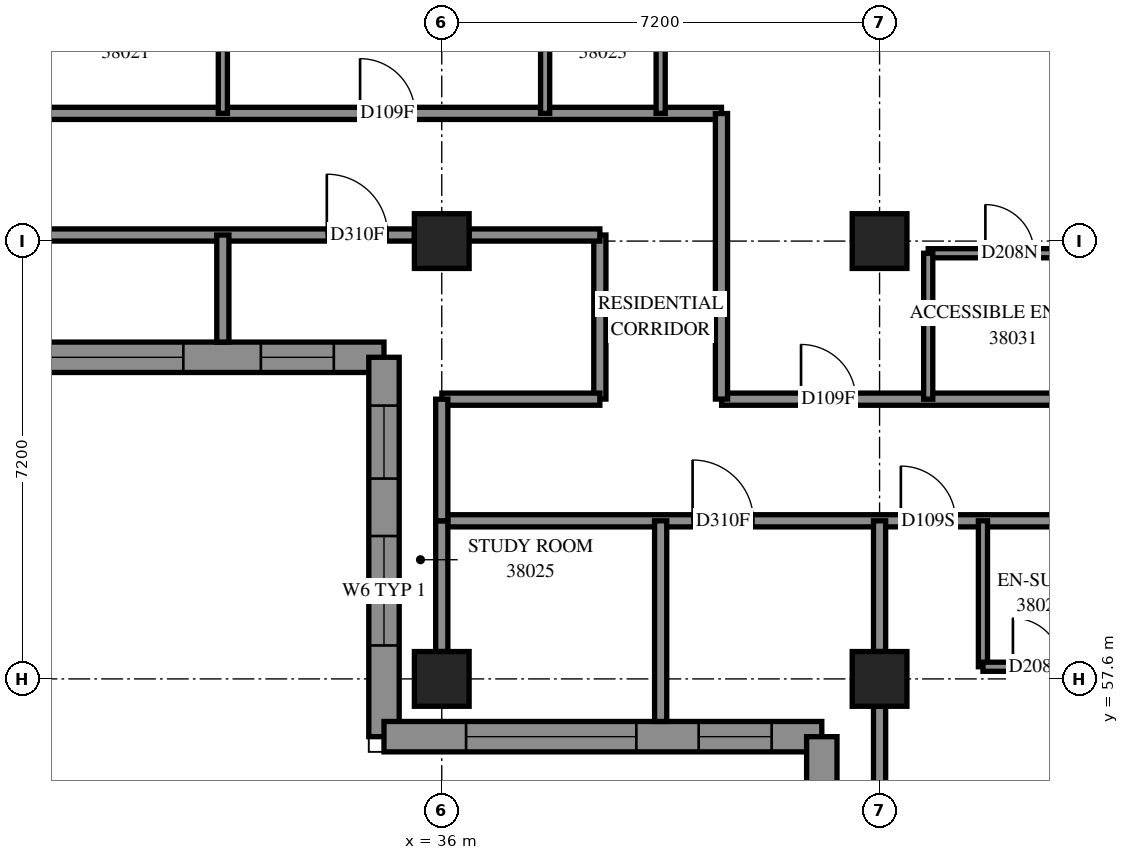
"""IFC4 building model, lengths in metres.
Left out: names, types, materials, properties, quantities, classifications, styles, units other than length and angle.
Written with IfcOpenShell. Run it as: python <this file> out.ifc"""

import sys

from ifc_helpers import new_model, si_unit, direction, frame, frame_2d, origin, origin_2d, place, context, subcontext, project, spatial, polyline, rectangle, outline, extrude, element, fill, save


model = new_model("IFC4")
c1 = context("Model", 3, precision=1e-05, world=origin(), true_north=direction((0.0, 1.0)))
c2 = subcontext(c1, "Body", "Model", "MODEL_VIEW")
j1 = project(units=[si_unit("LENGTHUNIT", "METRE"), si_unit("PLANEANGLEUNIT", "RADIAN")], contexts=[c1])
p1 = place(None, origin())
s1 = spatial("IfcSite", under=j1, at=p1, CompositionType="ELEMENT")
p2 = place(p1, origin())
s2 = spatial("IfcBuilding", under=s1, at=p2, CompositionType="ELEMENT")
p3 = place(p2, frame((0.0, 0.0, 142.2)))
s3 = spatial("IfcBuildingStorey", under=s2, at=p3, CompositionType="ELEMENT", Elevation=142.2)
for number, where, z_axis, x_axis in (
    (1, (36.0, 57.6, 0.0), (0.0, 0.0, 1.0), (1.0, 0.0, 0.0)),
    (2, (36.0, 64.8, 0.0), (0.0, 0.0, 1.0), (1.0, 0.0, 0.0)),
    (3, (43.2, 57.6, 0.0), (0.0, 0.0, 1.0), (1.0, 0.0, 0.0)),
    (4, (43.2, 64.8, 0.0), (0.0, 0.0, 1.0), (1.0, 0.0, 0.0)),
):
    element("IfcColumn", number, at=place(p3, frame(where, z_axis=z_axis, x_axis=x_axis)), inside=s3, PredefinedType="COLUMN", context=c2, shape_type="SweptSolid", body=[
        extrude(rectangle(XDim=0.9, YDim=0.9, at=origin_2d()), origin(), (0.0, 0.0, 1.0), 3.1),
    ])
p4 = place(p3, frame((19.689, 62.889, 0.0), z_axis=(0.0, 0.0, 1.0), x_axis=(1.0, 0.0, 0.0)))
e5 = element("IfcWall", 5, at=p4, inside=s3, PredefinedType="SOLIDWALL", context=c2, shape_type="SweptSolid", body=[
    extrude(outline(polyline([(-0.25, -0.25), (15.111, -0.25), (15.611, 0.25), (0.25, 0.25), (-0.25, -0.25)])), origin(), (0.0, 0.0, 1.0), 3.1),
])
p5 = place(p4, frame((2.311, 0.0, 0.45)))
e6 = element("IfcOpeningElement", 6, at=p5, cuts=e5, PredefinedType="OPENING", context=c2, shape_type="SweptSolid", body=[
    extrude(rectangle(XDim=2.8, YDim=2.5, at=frame_2d((1.4, 1.25))), frame((0.0, 0.26, 0.0), z_axis=(0.0, -1.0, 0.0), x_axis=(1.0, 0.0, 0.0)), (0.0, 0.0, 1.0), 0.52),
])
p6 = place(p4, frame((5.911, 0.0, 0.45)))
e7 = element("IfcOpeningElement", 7, at=p6, cuts=e5, PredefinedType="OPENING", context=c2, shape_type="SweptSolid", body=[
    extrude(rectangle(XDim=2.8, YDim=2.5, at=frame_2d((1.4, 1.25))), frame((0.0, 0.26, 0.0), z_axis=(0.0, -1.0, 0.0), x_axis=(1.0, 0.0, 0.0)), (0.0, 0.0, 1.0), 0.52),
])
p7 = place(p4, frame((9.261, 0.0, 0.45)))
e8 = element("IfcOpeningElement", 8, at=p7, cuts=e5, PredefinedType="OPENING", context=c2, shape_type="SweptSolid", body=[
    extrude(rectangle(XDim=2.8, YDim=2.5, at=frame_2d((1.4, 1.25))), frame((0.0, 0.26, 0.0), z_axis=(0.0, -1.0, 0.0), x_axis=(1.0, 0.0, 0.0)), (0.0, 0.0, 1.0), 0.52),
])
p8 = place(p4, frame((0.581, 0.0, 0.45)))
e9 = element("IfcOpeningElement", 9, at=p8, cuts=e5, PredefinedType="OPENING", context=c2, shape_type="SweptSolid", body=[
    extrude(rectangle(XDim=1.2, YDim=2.5, at=frame_2d((0.6, 1.25))), frame((0.0, 0.26, 0.0), z_axis=(0.0, -1.0, 0.0), x_axis=(1.0, 0.0, 0.0)), (0.0, 0.0, 1.0), 0.52),
])
p9 = place(p4, frame((13.336, 0.0, 0.45)))
e10 = element("IfcOpeningElement", 10, at=p9, cuts=e5, PredefinedType="OPENING", context=c2, shape_type="SweptSolid", body=[
    extrude(rectangle(XDim=1.2, YDim=2.5, at=frame_2d((0.6, 1.25))), frame((0.0, 0.26, 0.0), z_axis=(0.0, -1.0, 0.0), x_axis=(1.0, 0.0, 0.0)), (0.0, 0.0, 1.0), 0.52),
])
p10 = place(p3, frame((35.05, 62.889, 0.0), z_axis=(0.0, 0.0, 1.0), x_axis=(0.0, -1.0, 0.0)))
e11 = element("IfcWall", 11, at=p10, inside=s3, PredefinedType="SOLIDWALL", context=c2, shape_type="SweptSolid", body=[
    extrude(outline(polyline([(0.25, -0.25), (6.489, -0.25), (5.989, 0.25), (-0.25, 0.25), (0.25, -0.25)])), origin(), (0.0, 0.0, 1.0), 3.1),
])
p11 = place(p10, frame((0.794, 0.0, 0.45)))
e12 = element("IfcOpeningElement", 12, at=p11, cuts=e11, PredefinedType="OPENING", context=c2, shape_type="SweptSolid", body=[
    extrude(rectangle(XDim=1.2, YDim=2.5, at=frame_2d((0.6, 1.25))), frame((0.0, 0.26, 0.0), z_axis=(0.0, -1.0, 0.0), x_axis=(1.0, 0.0, 0.0)), (0.0, 0.0, 1.0), 0.52),
])
p12 = place(p10, frame((2.939, 0.0, 0.7)))
e13 = element("IfcOpeningElement", 13, at=p12, cuts=e11, PredefinedType="OPENING", context=c2, shape_type="SweptSolid", body=[
    extrude(rectangle(XDim=1.8, YDim=2.2, at=frame_2d((0.9, 1.1))), frame((0.0, 0.26, 0.0), z_axis=(0.0, -1.0, 0.0), x_axis=(1.0, 0.0, 0.0)), (0.0, 0.0, 1.0), 0.52),
])
p13 = place(p3, frame((35.05, 56.65, 0.0), z_axis=(0.0, 0.0, 1.0), x_axis=(1.0, 0.0, 0.0)))
e14 = element("IfcWall", 14, at=p13, inside=s3, PredefinedType="SOLIDWALL", context=c2, shape_type="SweptSolid", body=[
    extrude(outline(polyline([(-0.25, -0.25), (6.95, -0.25), (7.45, 0.25), (0.25, 0.25), (-0.25, -0.25)])), origin(), (0.0, 0.0, 1.0), 3.1),
])
p14 = place(p13, frame((1.35, 0.0, 0.45)))
e15 = element("IfcOpeningElement", 15, at=p14, cuts=e14, PredefinedType="OPENING", context=c2, shape_type="SweptSolid", body=[
    extrude(rectangle(XDim=2.8, YDim=2.5, at=frame_2d((1.4, 1.25))), frame((0.0, 0.26, 0.0), z_axis=(0.0, -1.0, 0.0), x_axis=(1.0, 0.0, 0.0)), (0.0, 0.0, 1.0), 0.52),
])
p15 = place(p13, frame((5.175, 0.0, 0.45)))
e16 = element("IfcOpeningElement", 16, at=p15, cuts=e14, PredefinedType="OPENING", context=c2, shape_type="SweptSolid", body=[
    extrude(rectangle(XDim=1.2, YDim=2.5, at=frame_2d((0.6, 1.25))), frame((0.0, 0.26, 0.0), z_axis=(0.0, -1.0, 0.0), x_axis=(1.0, 0.0, 0.0)), (0.0, 0.0, 1.0), 0.52),
])
p16 = place(p3, frame((42.25, 56.65, 0.0), z_axis=(0.0, 0.0, 1.0), x_axis=(0.0, -1.0, 0.0)))
e17 = element("IfcWall", 17, at=p16, inside=s3, PredefinedType="SOLIDWALL", context=c2, shape_type="SweptSolid", body=[
    extrude(outline(polyline([(0.25, -0.25), (7.45, -0.25), (6.95, 0.25), (-0.25, 0.25), (0.25, -0.25)])), origin(), (0.0, 0.0, 1.0), 3.1),
])
p17 = place(p16, frame((3.05, 0.0, 0.45)))
e18 = element("IfcOpeningElement", 18, at=p17, cuts=e17, PredefinedType="OPENING", context=c2, shape_type="SweptSolid", body=[
    extrude(rectangle(XDim=2.8, YDim=2.5, at=frame_2d((1.4, 1.25))), frame((0.0, 0.26, 0.0), z_axis=(0.0, -1.0, 0.0), x_axis=(1.0, 0.0, 0.0)), (0.0, 0.0, 1.0), 0.52),
])
p18 = place(p16, frame((0.825, 0.0, 0.45)))
e19 = element("IfcOpeningElement", 19, at=p18, cuts=e17, PredefinedType="OPENING", context=c2, shape_type="SweptSolid", body=[
    extrude(rectangle(XDim=1.2, YDim=2.5, at=frame_2d((0.6, 1.25))), frame((0.0, 0.26, 0.0), z_axis=(0.0, -1.0, 0.0), x_axis=(1.0, 0.0, 0.0)), (0.0, 0.0, 1.0), 0.52),
])
p19 = place(p3, frame((21.6, 66.9, 0.0), z_axis=(0.0, 0.0, 1.0), x_axis=(1.0, 0.0, 0.0)))
e20 = element("IfcWall", 20, at=p19, inside=s3, PredefinedType="PARTITIONING", context=c2, shape_type="SweptSolid", body=[
    extrude(rectangle(XDim=19.0, YDim=0.2, at=frame_2d((9.5, 0.0))), origin(), (0.0, 0.0, 1.0), 3.1),
])
p20 = place(p19, frame((2.3, 0.0, 0.0)))
e21 = element("IfcOpeningElement", 21, at=p20, cuts=e20, PredefinedType="OPENING", context=c2, shape_type="SweptSolid", body=[
    extrude(rectangle(XDim=0.9, YDim=2.1, at=frame_2d((0.45, 1.05))), frame((0.0, 0.11, 0.0), z_axis=(0.0, -1.0, 0.0), x_axis=(1.0, 0.0, 0.0)), (0.0, 0.0, 1.0), 0.22),
])
p21 = place(p19, frame((5.957, 0.0, 0.0)))
e22 = element("IfcOpeningElement", 22, at=p21, cuts=e20, PredefinedType="OPENING", context=c2, shape_type="SweptSolid", body=[
    extrude(rectangle(XDim=0.9, YDim=2.1, at=frame_2d((0.45, 1.05))), frame((0.0, 0.11, 0.0), z_axis=(0.0, -1.0, 0.0), x_axis=(1.0, 0.0, 0.0)), (0.0, 0.0, 1.0), 0.22),
])
p22 = place(p19, frame((13.057, 0.0, 0.0)))
e23 = element("IfcOpeningElement", 23, at=p22, cuts=e20, PredefinedType="OPENING", context=c2, shape_type="SweptSolid", body=[
    extrude(rectangle(XDim=0.9, YDim=2.1, at=frame_2d((0.45, 1.05))), frame((0.0, 0.11, 0.0), z_axis=(0.0, -1.0, 0.0), x_axis=(1.0, 0.0, 0.0)), (0.0, 0.0, 1.0), 0.22),
])
p23 = place(p3, frame((36.0, 60.2, 0.0), z_axis=(0.0, 0.0, 1.0), x_axis=(1.0, 0.0, 0.0)))
e24 = element("IfcWall", 24, at=p23, inside=s3, PredefinedType="PARTITIONING", context=c2, shape_type="SweptSolid", body=[
    extrude(rectangle(XDim=17.0, YDim=0.2, at=frame_2d((8.5, 0.0))), origin(), (0.0, 0.0, 1.0), 3.1),
])
p24 = place(p23, frame((15.805, 0.0, 0.0)))
e25 = element("IfcOpeningElement", 25, at=p24, cuts=e24, PredefinedType="OPENING", context=c2, shape_type="SweptSolid", body=[
    extrude(rectangle(XDim=1.0, YDim=2.1, at=frame_2d((0.5, 1.05))), frame((0.0, 0.11, 0.0), z_axis=(0.0, -1.0, 0.0), x_axis=(1.0, 0.0, 0.0)), (0.0, 0.0, 1.0), 0.22),
])
p25 = place(p23, frame((4.125, 0.0, 0.0)))
e26 = element("IfcOpeningElement", 26, at=p25, cuts=e24, PredefinedType="OPENING", context=c2, shape_type="SweptSolid", body=[
    extrude(rectangle(XDim=1.0, YDim=2.1, at=frame_2d((0.5, 1.05))), frame((0.0, 0.11, 0.0), z_axis=(0.0, -1.0, 0.0), x_axis=(1.0, 0.0, 0.0)), (0.0, 0.0, 1.0), 0.22),
])
p26 = place(p23, frame((7.55, 0.0, 0.0)))
e27 = element("IfcOpeningElement", 27, at=p26, cuts=e24, PredefinedType="OPENING", context=c2, shape_type="SweptSolid", body=[
    extrude(rectangle(XDim=0.9, YDim=2.1, at=frame_2d((0.45, 1.05))), frame((0.0, 0.11, 0.0), z_axis=(0.0, -1.0, 0.0), x_axis=(1.0, 0.0, 0.0)), (0.0, 0.0, 1.0), 0.22),
])
p27 = place(p23, frame((11.635, 0.0, 0.0)))
e28 = element("IfcOpeningElement", 28, at=p27, cuts=e24, PredefinedType="OPENING", context=c2, shape_type="SweptSolid", body=[
    extrude(rectangle(XDim=1.0, YDim=2.1, at=frame_2d((0.5, 1.05))), frame((0.0, 0.11, 0.0), z_axis=(0.0, -1.0, 0.0), x_axis=(1.0, 0.0, 0.0)), (0.0, 0.0, 1.0), 0.22),
])
p28 = place(p3, frame((40.602, 62.2, 0.0), z_axis=(0.0, 0.0, 1.0), x_axis=(1.0, 0.0, 0.0)))
e29 = element("IfcWall", 29, at=p28, inside=s3, PredefinedType="PARTITIONING", context=c2, shape_type="SweptSolid", body=[
    extrude(rectangle(XDim=14.298, YDim=0.2, at=frame_2d((7.149, 0.0))), origin(), (0.0, 0.0, 1.0), 3.1),
])
p29 = place(p28, frame((1.306, 0.0, 0.0)))
e30 = element("IfcOpeningElement", 30, at=p29, cuts=e29, PredefinedType="OPENING", context=c2, shape_type="SweptSolid", body=[
    extrude(rectangle(XDim=0.9, YDim=2.1, at=frame_2d((0.45, 1.05))), frame((0.0, 0.11, 0.0), z_axis=(0.0, -1.0, 0.0), x_axis=(1.0, 0.0, 0.0)), (0.0, 0.0, 1.0), 0.22),
])
p30 = place(p28, frame((8.455, 0.0, 0.0)))
e31 = element("IfcOpeningElement", 31, at=p30, cuts=e29, PredefinedType="OPENING", context=c2, shape_type="SweptSolid", body=[
    extrude(rectangle(XDim=0.9, YDim=2.1, at=frame_2d((0.45, 1.05))), frame((0.0, 0.11, 0.0), z_axis=(0.0, -1.0, 0.0), x_axis=(1.0, 0.0, 0.0)), (0.0, 0.0, 1.0), 0.22),
])
p31 = place(p3, frame((29.25, 64.9, 0.0), z_axis=(0.0, 0.0, 1.0), x_axis=(1.0, 0.0, 0.0)))
e32 = element("IfcWall", 32, at=p31, inside=s3, PredefinedType="PARTITIONING", context=c2, shape_type="SweptSolid", body=[
    extrude(rectangle(XDim=6.3, YDim=0.2, at=frame_2d((3.15, 0.0))), origin(), (0.0, 0.0, 1.0), 2.6),
])
p32 = place(p31, frame((4.86, 0.0, 0.0)))
e33 = element("IfcOpeningElement", 33, at=p32, cuts=e32, PredefinedType="OPENING", context=c2, shape_type="SweptSolid", body=[
    extrude(rectangle(XDim=1.0, YDim=2.1, at=frame_2d((0.5, 1.05))), frame((0.0, 0.11, 0.0), z_axis=(0.0, -1.0, 0.0), x_axis=(1.0, 0.0, 0.0)), (0.0, 0.0, 1.0), 0.22),
])
p33 = place(p3, frame((43.2, 50.85, 0.0), z_axis=(0.0, 0.0, 1.0), x_axis=(0.0, 1.0, 0.0)))
e34 = element("IfcWall", 34, at=p33, inside=s3, PredefinedType="PARTITIONING", context=c2, shape_type="SweptSolid", body=[
    extrude(rectangle(XDim=6.3, YDim=0.2, at=frame_2d((3.15, 0.0))), origin(), (0.0, 0.0, 1.0), 2.6),
])
p34 = place(p3, frame((40.6, 62.202, 0.0), z_axis=(0.0, 0.0, 1.0), x_axis=(0.0, 1.0, 0.0)))
e35 = element("IfcWall", 35, at=p34, inside=s3, PredefinedType="PARTITIONING", context=c2, shape_type="SweptSolid", body=[
    extrude(rectangle(XDim=4.696, YDim=0.2, at=frame_2d((2.348, 0.0))), origin(), (0.0, 0.0, 1.0), 3.1),
])
p35 = place(p3, frame((39.6, 56.9, 0.0), z_axis=(0.0, 0.0, 1.0), x_axis=(0.0, 1.0, 0.0)))
e36 = element("IfcWall", 36, at=p35, inside=s3, PredefinedType="PARTITIONING", context=c2, shape_type="SweptSolid", body=[
    extrude(rectangle(XDim=3.3, YDim=0.2, at=frame_2d((1.65, 0.0))), origin(), (0.0, 0.0, 1.0), 3.1),
])
p36 = place(p3, frame((44.0, 64.6, 0.0), z_axis=(0.0, 0.0, 1.0), x_axis=(1.0, 0.0, 0.0)))
e37 = element("IfcWall", 37, at=p36, inside=s3, PredefinedType="PARTITIONING", context=c2, shape_type="SweptSolid", body=[
    extrude(rectangle(XDim=2.8, YDim=0.15, at=frame_2d((1.4, 0.0))), origin(), (0.0, 0.0, 1.0), 3.1),
])
p37 = place(p36, frame((0.94, 0.0, 0.0)))
e38 = element("IfcOpeningElement", 38, at=p37, cuts=e37, PredefinedType="OPENING", context=c2, shape_type="SweptSolid", body=[
    extrude(rectangle(XDim=0.8, YDim=2.1, at=frame_2d((0.4, 1.05))), frame((0.0, 0.085, 0.0), z_axis=(0.0, -1.0, 0.0), x_axis=(1.0, 0.0, 0.0)), (0.0, 0.0, 1.0), 0.17),
])
p38 = place(p3, frame((38.6, 62.202, 0.0), z_axis=(0.0, 0.0, 1.0), x_axis=(0.0, 1.0, 0.0)))
e39 = element("IfcWall", 39, at=p38, inside=s3, PredefinedType="PARTITIONING", context=c2, shape_type="SweptSolid", body=[
    extrude(rectangle(XDim=2.698, YDim=0.2, at=frame_2d((1.349, 0.0))), origin(), (0.0, 0.0, 1.0), 3.1),
])
p39 = place(p3, frame((36.002, 62.2, 0.0), z_axis=(0.0, 0.0, 1.0), x_axis=(1.0, 0.0, 0.0)))
e40 = element("IfcWall", 40, at=p39, inside=s3, PredefinedType="PARTITIONING", context=c2, shape_type="SweptSolid", body=[
    extrude(rectangle(XDim=2.598, YDim=0.2, at=frame_2d((1.299, 0.0))), origin(), (0.0, 0.0, 1.0), 3.1),
])
for number, where, z_axis, x_axis in (
    (41, (44.9, 57.8, 0.0), (0.0, 0.0, 1.0), (0.0, 1.0, 0.0)),
    (42, (32.4, 66.9, 0.0), (0.0, 0.0, 1.0), (0.0, 1.0, 0.0)),
    (43, (37.7, 66.9, 0.0), (0.0, 0.0, 1.0), (0.0, 1.0, 0.0)),
    (44, (39.6, 66.9, 0.0), (0.0, 0.0, 1.0), (0.0, 1.0, 0.0)),
    (45, (44.0, 62.2, 0.0), (0.0, 0.0, 1.0), (0.0, 1.0, 0.0)),
):
    element("IfcWall", number, at=place(p3, frame(where, z_axis=z_axis, x_axis=x_axis)), inside=s3, PredefinedType="PARTITIONING", context=c2, shape_type="SweptSolid", body=[
        extrude(rectangle(XDim=2.4, YDim=0.15, at=frame_2d((1.2, 0.0))), origin(), (0.0, 0.0, 1.0), 3.1),
    ])
p40 = place(p3, frame((36.0, 58.05, 0.0), z_axis=(0.0, 0.0, 1.0), x_axis=(0.0, 1.0, 0.0)))
e46 = element("IfcWall", 46, at=p40, inside=s3, PredefinedType="PARTITIONING", context=c2, shape_type="SweptSolid", body=[
    extrude(rectangle(XDim=2.15, YDim=0.2, at=frame_2d((1.075, 0.0))), origin(), (0.0, 0.0, 1.0), 2.6),
])
for number, where, z_axis, x_axis in (
    (47, (43.2, 58.05, 0.0), (0.0, 0.0, 1.0), (0.0, 1.0, 0.0)),
    (48, (36.45, 64.9, 0.0), (0.0, 0.0, 1.0), (1.0, 0.0, 0.0)),
):
    element("IfcWall", number, at=place(p3, frame(where, z_axis=z_axis, x_axis=x_axis)), inside=s3, PredefinedType="PARTITIONING", context=c2, shape_type="SweptSolid", body=[
        extrude(rectangle(XDim=2.15, YDim=0.2, at=frame_2d((1.075, 0.0))), origin(), (0.0, 0.0, 1.0), 3.1),
    ])
p41 = place(p3, frame((36.0, 60.2, 0.0), z_axis=(0.0, 0.0, 1.0), x_axis=(0.0, 1.0, 0.0)))
e49 = element("IfcWall", 49, at=p41, inside=s3, PredefinedType="PARTITIONING", context=c2, shape_type="SweptSolid", body=[
    extrude(rectangle(XDim=2.0, YDim=0.2, at=frame_2d((1.0, 0.0))), origin(), (0.0, 0.0, 1.0), 2.6),
])
p42 = place(p3, frame((44.9, 57.8, 0.0), z_axis=(0.0, 0.0, 1.0), x_axis=(1.0, 0.0, 0.0)))
e50 = element("IfcWall", 50, at=p42, inside=s3, PredefinedType="PARTITIONING", context=c2, shape_type="SweptSolid", body=[
    extrude(rectangle(XDim=1.9, YDim=0.15, at=frame_2d((0.95, 0.0))), origin(), (0.0, 0.0, 1.0), 3.1),
])
p43 = place(p42, frame((0.493, 0.0, 0.0)))
e51 = element("IfcOpeningElement", 51, at=p43, cuts=e50, PredefinedType="OPENING", context=c2, shape_type="SweptSolid", body=[
    extrude(rectangle(XDim=0.8, YDim=2.1, at=frame_2d((0.4, 1.05))), frame((0.0, 0.085, 0.0), z_axis=(0.0, -1.0, 0.0), x_axis=(1.0, 0.0, 0.0)), (0.0, 0.0, 1.0), 0.17),
])
p44 = place(p3, frame((32.4, 63.139, 0.0), z_axis=(0.0, 0.0, 1.0), x_axis=(0.0, 1.0, 0.0)))
e52 = element("IfcWall", 52, at=p44, inside=s3, PredefinedType="PARTITIONING", context=c2, shape_type="SweptSolid", body=[
    extrude(rectangle(XDim=1.761, YDim=0.2, at=frame_2d((0.88, 0.0))), origin(), (0.0, 0.0, 1.0), 3.1),
])
p45 = place(p7, origin())
e53 = element("IfcWindow", 53, at=p45, inside=s3, PartitioningType="SINGLE_PANEL", PredefinedType="WINDOW", context=c2, shape_type="SweptSolid", body=[
    extrude(rectangle(XDim=2.8, YDim=2.5, at=frame_2d((1.4, 1.25))), frame((0.0, 0.18, 0.0), z_axis=(0.0, -1.0, 0.0), x_axis=(1.0, 0.0, 0.0)), (0.0, 0.0, 1.0), 0.06),
])
fill(e8, e53)
p46 = place(p9, origin())
e54 = element("IfcWindow", 54, at=p46, inside=s3, PartitioningType="SINGLE_PANEL", PredefinedType="WINDOW", context=c2, shape_type="SweptSolid", body=[
    extrude(rectangle(XDim=1.2, YDim=2.5, at=frame_2d((0.6, 1.25))), frame((0.0, 0.18, 0.0), z_axis=(0.0, -1.0, 0.0), x_axis=(1.0, 0.0, 0.0)), (0.0, 0.0, 1.0), 0.06),
])
fill(e10, e54)
p47 = place(p11, origin())
e55 = element("IfcWindow", 55, at=p47, inside=s3, PartitioningType="SINGLE_PANEL", PredefinedType="WINDOW", context=c2, shape_type="SweptSolid", body=[
    extrude(rectangle(XDim=1.2, YDim=2.5, at=frame_2d((0.6, 1.25))), frame((0.0, 0.18, 0.0), z_axis=(0.0, -1.0, 0.0), x_axis=(1.0, 0.0, 0.0)), (0.0, 0.0, 1.0), 0.06),
])
fill(e12, e55)
p48 = place(p14, origin())
e56 = element("IfcWindow", 56, at=p48, inside=s3, PartitioningType="SINGLE_PANEL", PredefinedType="WINDOW", context=c2, shape_type="SweptSolid", body=[
    extrude(rectangle(XDim=2.8, YDim=2.5, at=frame_2d((1.4, 1.25))), frame((0.0, 0.18, 0.0), z_axis=(0.0, -1.0, 0.0), x_axis=(1.0, 0.0, 0.0)), (0.0, 0.0, 1.0), 0.06),
])
fill(e15, e56)
p49 = place(p15, origin())
e57 = element("IfcWindow", 57, at=p49, inside=s3, PartitioningType="SINGLE_PANEL", PredefinedType="WINDOW", context=c2, shape_type="SweptSolid", body=[
    extrude(rectangle(XDim=1.2, YDim=2.5, at=frame_2d((0.6, 1.25))), frame((0.0, 0.18, 0.0), z_axis=(0.0, -1.0, 0.0), x_axis=(1.0, 0.0, 0.0)), (0.0, 0.0, 1.0), 0.06),
])
fill(e16, e57)
p50 = place(p22, origin())
e58 = element("IfcDoor", 58, at=p50, inside=s3, OperationType="SINGLE_SWING_LEFT", PredefinedType="DOOR", context=c2, shape_type="SweptSolid", body=[
    extrude(rectangle(XDim=0.9, YDim=2.1, at=frame_2d((0.45, 1.05))), frame((0.0, 0.025, 0.0), z_axis=(0.0, -1.0, 0.0), x_axis=(1.0, 0.0, 0.0)), (0.0, 0.0, 1.0), 0.05),
])
fill(e23, e58)
p51 = place(p32, origin())
e59 = element("IfcDoor", 59, at=p51, inside=s3, OperationType="SINGLE_SWING_RIGHT", PredefinedType="DOOR", context=c2, shape_type="SweptSolid", body=[
    extrude(rectangle(XDim=1.0, YDim=2.1, at=frame_2d((0.5, 1.05))), frame((0.0, 0.025, 0.0), z_axis=(0.0, -1.0, 0.0), x_axis=(1.0, 0.0, 0.0)), (0.0, 0.0, 1.0), 0.05),
])
fill(e33, e59)
p52 = place(p25, origin())
e60 = element("IfcDoor", 60, at=p52, inside=s3, OperationType="SINGLE_SWING_RIGHT", PredefinedType="DOOR", context=c2, shape_type="SweptSolid", body=[
    extrude(rectangle(XDim=1.0, YDim=2.1, at=frame_2d((0.5, 1.05))), frame((0.0, 0.025, 0.0), z_axis=(0.0, -1.0, 0.0), x_axis=(1.0, 0.0, 0.0)), (0.0, 0.0, 1.0), 0.05),
])
fill(e26, e60)
p53 = place(p26, origin())
e61 = element("IfcDoor", 61, at=p53, inside=s3, OperationType="SINGLE_SWING_LEFT", PredefinedType="DOOR", context=c2, shape_type="SweptSolid", body=[
    extrude(rectangle(XDim=0.9, YDim=2.1, at=frame_2d((0.45, 1.05))), frame((0.0, 0.025, 0.0), z_axis=(0.0, -1.0, 0.0), x_axis=(1.0, 0.0, 0.0)), (0.0, 0.0, 1.0), 0.05),
])
fill(e27, e61)
p54 = place(p43, origin())
e62 = element("IfcDoor", 62, at=p54, inside=s3, OperationType="SINGLE_SWING_RIGHT", PredefinedType="DOOR", context=c2, shape_type="SweptSolid", body=[
    extrude(rectangle(XDim=0.8, YDim=2.1, at=frame_2d((0.4, 1.05))), frame((0.0, 0.025, 0.0), z_axis=(0.0, -1.0, 0.0), x_axis=(1.0, 0.0, 0.0)), (0.0, 0.0, 1.0), 0.05),
])
fill(e51, e62)
p55 = place(p29, origin())
e63 = element("IfcDoor", 63, at=p55, inside=s3, OperationType="SINGLE_SWING_LEFT", PredefinedType="DOOR", context=c2, shape_type="SweptSolid", body=[
    extrude(rectangle(XDim=0.9, YDim=2.1, at=frame_2d((0.45, 1.05))), frame((0.0, 0.025, 0.0), z_axis=(0.0, -1.0, 0.0), x_axis=(1.0, 0.0, 0.0)), (0.0, 0.0, 1.0), 0.05),
])
fill(e30, e63)
p56 = place(p37, origin())
e64 = element("IfcDoor", 64, at=p56, inside=s3, OperationType="SINGLE_SWING_RIGHT", PredefinedType="DOOR", context=c2, shape_type="SweptSolid", body=[
    extrude(rectangle(XDim=0.8, YDim=2.1, at=frame_2d((0.4, 1.05))), frame((0.0, 0.025, 0.0), z_axis=(0.0, -1.0, 0.0), x_axis=(1.0, 0.0, 0.0)), (0.0, 0.0, 1.0), 0.05),
])
fill(e38, e64)
p57 = place(p12, origin())
e65 = element("IfcWindow", 65, at=p57, inside=s3, PartitioningType="SINGLE_PANEL", PredefinedType="WINDOW", context=c2, shape_type="SweptSolid", body=[
    extrude(rectangle(XDim=1.8, YDim=2.2, at=frame_2d((0.9, 1.1))), frame((0.0, 0.18, 0.0), z_axis=(0.0, -1.0, 0.0), x_axis=(1.0, 0.0, 0.0)), (0.0, 0.0, 1.0), 0.06),
])
fill(e13, e65)
save(model, sys.argv[1])
